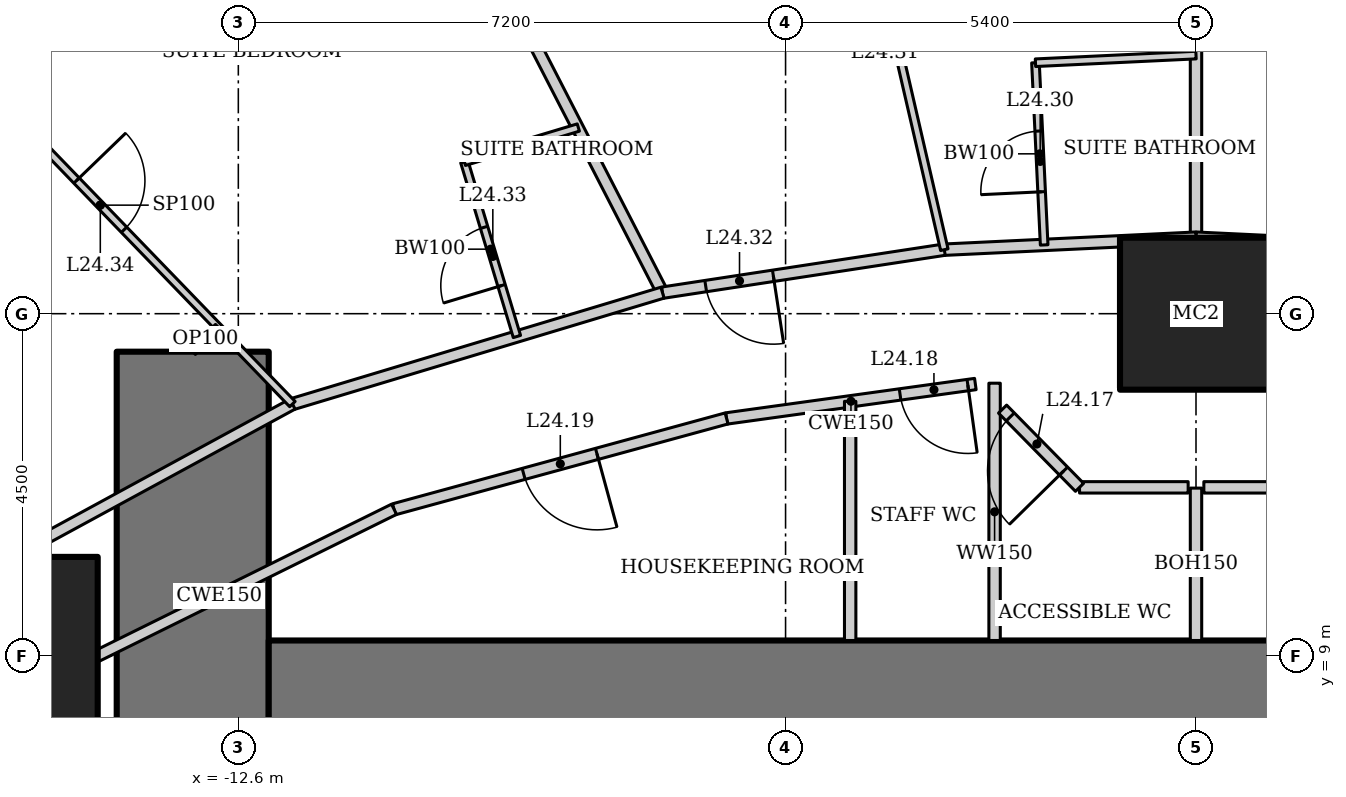
"""IFC4 building model, lengths in metres.
Left out: names, types, materials, properties, quantities, classifications, styles, units other than length and angle.
Written with IfcOpenShell. Run it as: python <this file> out.ifc"""

import sys

from ifc_helpers import new_model, si_unit, direction, frame, frame_2d, origin, origin_2d, place, context, subcontext, project, spatial, rectangle, hollow_rectangle, extrude, element, fill, save


model = new_model("IFC4")
c1 = context("Model", 3, precision=1e-05, world=origin(), true_north=direction((0.0, 1.0)))
c2 = subcontext(c1, "Body", "Model", "MODEL_VIEW")
j1 = project(units=[si_unit("LENGTHUNIT", "METRE"), si_unit("PLANEANGLEUNIT", "RADIAN")], contexts=[c1])
p1 = place(None, origin())
s1 = spatial("IfcSite", under=j1, at=p1, CompositionType="ELEMENT")
p2 = place(p1, origin())
s2 = spatial("IfcBuilding", under=s1, at=p2, CompositionType="ELEMENT")
p3 = place(p2, frame((0.0, 0.0, 101.8)))
s3 = spatial("IfcBuildingStorey", under=s2, at=p3, CompositionType="ELEMENT", Elevation=101.8)
p4 = place(p3, frame((0.0, 13.5, 0.0), z_axis=(0.0, 0.0, 1.0), x_axis=(1.0, 0.0, 0.0)))
e1 = element("IfcColumn", 1, at=p4, inside=s3, PredefinedType="COLUMN", context=c2, shape_type="SweptSolid", body=[
    extrude(hollow_rectangle(XDim=2.0, YDim=2.0, WallThickness=0.17, at=origin_2d()), origin(), (0.0, 0.0, 1.0), 3.6),
])
p5 = place(p3, frame((-15.75, 9.0, 0.0), z_axis=(0.0, 0.0, 1.0), x_axis=(1.0, 0.0, 0.0)))
e2 = element("IfcColumn", 2, at=p5, inside=s3, PredefinedType="COLUMN", context=c2, shape_type="SweptSolid", body=[
    extrude(hollow_rectangle(XDim=2.6, YDim=2.6, WallThickness=0.13, at=origin_2d()), origin(), (0.0, 0.0, 1.0), 3.6),
])
p6 = place(p3, frame((-13.2, 13.0, 0.0), z_axis=(0.0, 0.0, 1.0), x_axis=(0.0, -1.0, 0.0)))
e3 = element("IfcWall", 3, at=p6, inside=s3, PredefinedType="SHEAR", context=c2, shape_type="SweptSolid", body=[
    extrude(rectangle(XDim=26.0, YDim=2.0, at=frame_2d((13.0, 0.0))), origin(), (0.0, 0.0, 1.0), 3.6),
])
p7 = place(p6, frame((12.1, 0.0, 0.0)))
e4 = element("IfcOpeningElement", 4, at=p7, cuts=e3, PredefinedType="OPENING", context=c2, shape_type="SweptSolid", body=[
    extrude(rectangle(XDim=1.8, YDim=2.1, at=frame_2d((0.9, 1.05))), frame((0.0, 1.01, 0.0), z_axis=(0.0, -1.0, 0.0), x_axis=(1.0, 0.0, 0.0)), (0.0, 0.0, 1.0), 2.02),
])
p8 = place(p3, frame((12.2, 8.0, 0.0), z_axis=(0.0, 0.0, 1.0), x_axis=(-1.0, 0.0, 0.0)))
e5 = element("IfcWall", 5, at=p8, inside=s3, PredefinedType="SHEAR", context=c2, shape_type="SweptSolid", body=[
    extrude(rectangle(XDim=24.4, YDim=2.4, at=frame_2d((12.2, 0.0))), origin(), (0.0, 0.0, 1.0), 3.6),
])
p9 = place(p3, frame((0.0, 22.825, 0.0), z_axis=(0.0, 0.0, 1.0), x_axis=(0.0, -1.0, 0.0)))
e6 = element("IfcWall", 6, at=p9, inside=s3, PredefinedType="PARTITIONING", context=c2, shape_type="SweptSolid", body=[
    extrude(rectangle(XDim=8.325, YDim=0.15, at=frame_2d((4.162, 0.0))), origin(), (0.0, 0.0, 1.0), 2.2),
])
p10 = place(p3, frame((-10.912, 21.346, 0.0), z_axis=(0.0, 0.0, 1.0), x_axis=(0.457327273085, -0.889298468059, 0.0)))
e7 = element("IfcWall", 7, at=p10, inside=s3, PredefinedType="PARTITIONING", context=c2, shape_type="SweptSolid", body=[
    extrude(rectangle(XDim=8.511, YDim=0.15, at=frame_2d((4.256, 0.0))), origin(), (0.0, 0.0, 1.0), 2.463),
])
p11 = place(p3, frame((3.311, 14.342, 0.0), z_axis=(0.0, 0.0, 1.0), x_axis=(-0.998863968075, 0.047652631422, 0.0)))
e8 = element("IfcWall", 8, at=p11, inside=s3, PredefinedType="PARTITIONING", context=c2, shape_type="SweptSolid", body=[
    extrude(rectangle(XDim=3.315, YDim=0.15, at=frame_2d((1.657, 0.0))), origin(), (0.0, 0.0, 1.0), 3.4),
])
p12 = place(p11, frame((0.15, 0.0, 0.0)))
e9 = element("IfcOpeningElement", 9, at=p12, cuts=e8, PredefinedType="OPENING", context=c2, shape_type="SweptSolid", body=[
    extrude(rectangle(XDim=0.9, YDim=2.1, at=frame_2d((0.45, 1.05))), frame((0.0, 0.085, 0.0), z_axis=(0.0, -1.0, 0.0), x_axis=(1.0, 0.0, 0.0)), (0.0, 0.0, 1.0), 0.17),
])
p13 = place(p3, frame((0.0, 14.5, 0.0), z_axis=(0.0, 0.0, 1.0), x_axis=(-0.998863968075, -0.047652631422, 0.0)))
e10 = element("IfcWall", 10, at=p13, inside=s3, PredefinedType="PARTITIONING", context=c2, shape_type="SweptSolid", body=[
    extrude(rectangle(XDim=3.315, YDim=0.15, at=frame_2d((1.657, 0.0))), origin(), (0.0, 0.0, 1.0), 3.4),
])
p14 = place(p3, frame((-3.311, 14.342, 0.0), z_axis=(0.0, 0.0, 1.0), x_axis=(-0.988564270062, -0.150800145746, 0.0)))
e11 = element("IfcWall", 11, at=p14, inside=s3, PredefinedType="PARTITIONING", context=c2, shape_type="SweptSolid", body=[
    extrude(rectangle(XDim=3.751, YDim=0.15, at=frame_2d((1.875, 0.0))), origin(), (0.0, 0.0, 1.0), 3.4),
])
p15 = place(p14, frame((2.276, 0.0, 0.0)))
e12 = element("IfcOpeningElement", 12, at=p15, cuts=e11, PredefinedType="OPENING", context=c2, shape_type="SweptSolid", body=[
    extrude(rectangle(XDim=0.9, YDim=2.1, at=frame_2d((0.45, 1.05))), frame((0.0, 0.085, 0.0), z_axis=(0.0, -1.0, 0.0), x_axis=(1.0, 0.0, 0.0)), (0.0, 0.0, 1.0), 0.17),
])
p16 = place(p3, frame((-7.019, 13.776, 0.0), z_axis=(0.0, 0.0, 1.0), x_axis=(-0.957564241242, -0.288219922793, 0.0)))
e13 = element("IfcWall", 13, at=p16, inside=s3, PredefinedType="PARTITIONING", context=c2, shape_type="SweptSolid", body=[
    extrude(rectangle(XDim=5.085, YDim=0.15, at=frame_2d((2.542, 0.0))), origin(), (0.0, 0.0, 1.0), 3.4),
])
p17 = place(p3, frame((-11.888, 12.311, 0.0), z_axis=(0.0, 0.0, 1.0), x_axis=(-0.878450059298, -0.477834169267, 0.0)))
e14 = element("IfcWall", 14, at=p17, inside=s3, PredefinedType="PARTITIONING", context=c2, shape_type="SweptSolid", body=[
    extrude(rectangle(XDim=5.631, YDim=0.15, at=frame_2d((2.815, 0.0))), origin(), (0.0, 0.0, 1.0), 3.4),
])
p18 = place(p3, frame((-2.903, 12.574, 0.0), z_axis=(0.0, 0.0, 1.0), x_axis=(-0.990563451353, -0.137054911782, 0.0)))
e15 = element("IfcWall", 15, at=p18, inside=s3, PredefinedType="PARTITIONING", context=c2, shape_type="SweptSolid", body=[
    extrude(rectangle(XDim=3.304, YDim=0.15, at=frame_2d((1.652, 0.0))), origin(), (0.0, 0.0, 1.0), 3.4),
])
p19 = place(p18, frame((0.1, 0.0, 0.0)))
e16 = element("IfcOpeningElement", 16, at=p19, cuts=e15, PredefinedType="OPENING", context=c2, shape_type="SweptSolid", body=[
    extrude(rectangle(XDim=0.9, YDim=2.1, at=frame_2d((0.45, 1.05))), frame((0.0, 0.085, 0.0), z_axis=(0.0, -1.0, 0.0), x_axis=(1.0, 0.0, 0.0)), (0.0, 0.0, 1.0), 0.17),
])
p20 = place(p3, frame((-6.176, 12.122, 0.0), z_axis=(0.0, 0.0, 1.0), x_axis=(-0.964644466646, -0.263554648923, 0.0)))
e17 = element("IfcWall", 17, at=p20, inside=s3, PredefinedType="PARTITIONING", context=c2, shape_type="SweptSolid", body=[
    extrude(rectangle(XDim=4.535, YDim=0.15, at=frame_2d((2.268, 0.0))), origin(), (0.0, 0.0, 1.0), 3.4),
])
p21 = place(p20, frame((1.768, 0.0, 0.0)))
e18 = element("IfcOpeningElement", 18, at=p21, cuts=e17, PredefinedType="OPENING", context=c2, shape_type="SweptSolid", body=[
    extrude(rectangle(XDim=1.0, YDim=2.1, at=frame_2d((0.5, 1.05))), frame((0.0, 0.085, 0.0), z_axis=(0.0, -1.0, 0.0), x_axis=(1.0, 0.0, 0.0)), (0.0, 0.0, 1.0), 0.17),
])
p22 = place(p3, frame((-10.551, 10.926, 0.0), z_axis=(0.0, 0.0, 1.0), x_axis=(-0.89656943448, -0.442903205177, 0.0)))
e19 = element("IfcWall", 19, at=p22, inside=s3, PredefinedType="PARTITIONING", context=c2, shape_type="SweptSolid", body=[
    extrude(rectangle(XDim=5.126, YDim=0.15, at=frame_2d((2.563, 0.0))), origin(), (0.0, 0.0, 1.0), 3.4),
])
p23 = place(p3, frame((-2.65, 9.2, 0.0), z_axis=(0.0, 0.0, 1.0), x_axis=(0.0, 1.0, 0.0)))
e20 = element("IfcWall", 20, at=p23, inside=s3, PredefinedType="SOLIDWALL", context=c2, shape_type="SweptSolid", body=[
    extrude(rectangle(XDim=3.385, YDim=0.15, at=frame_2d((1.693, 0.0))), origin(), (0.0, 0.0, 1.0), 2.554),
])
p24 = place(p3, frame((-4.55, 9.2, 0.0), z_axis=(0.0, 0.0, 1.0), x_axis=(0.0, 1.0, 0.0)))
e21 = element("IfcWall", 21, at=p24, inside=s3, PredefinedType="SOLIDWALL", context=c2, shape_type="SweptSolid", body=[
    extrude(rectangle(XDim=3.147, YDim=0.15, at=frame_2d((1.573, 0.0))), origin(), (0.0, 0.0, 1.0), 3.4),
])
p25 = place(p3, frame((-1.998, 14.405, 0.0), z_axis=(0.0, 0.0, 1.0), x_axis=(-0.047608648396, 0.998866065395, 0.0)))
e22 = element("IfcWall", 22, at=p25, inside=s3, PredefinedType="PARTITIONING", context=c2, shape_type="SweptSolid", body=[
    extrude(rectangle(XDim=2.4, YDim=0.1, at=frame_2d((1.2, 0.0))), origin(), (0.0, 0.0, 1.0), 2.628),
])
p26 = place(p25, frame((0.7, 0.0, 0.0)))
e23 = element("IfcOpeningElement", 23, at=p26, cuts=e22, PredefinedType="OPENING", context=c2, shape_type="SweptSolid", body=[
    extrude(rectangle(XDim=0.8, YDim=2.1, at=frame_2d((0.4, 1.05))), frame((0.0, 0.06, 0.0), z_axis=(0.0, -1.0, 0.0), x_axis=(1.0, 0.0, 0.0)), (0.0, 0.0, 1.0), 0.12),
])
p27 = place(p3, frame((-2.112, 16.802, 0.0), z_axis=(0.0, 0.0, 1.0), x_axis=(0.998862383453, 0.047685835668, 0.0)))
e24 = element("IfcWall", 24, at=p27, inside=s3, PredefinedType="PARTITIONING", context=c2, shape_type="SweptSolid", body=[
    extrude(rectangle(XDim=2.115, YDim=0.1, at=frame_2d((1.057, 0.0))), origin(), (0.0, 0.0, 1.0), 3.4),
])
p28 = place(p3, frame((-4.874, 21.111, 0.0), z_axis=(0.0, 0.0, 1.0), x_axis=(0.224957040173, -0.974368682828, 0.0)))
e25 = element("IfcWall", 25, at=p28, inside=s3, PredefinedType="PARTITIONING", context=c2, shape_type="SweptSolid", body=[
    extrude(rectangle(XDim=6.947, YDim=0.1, at=frame_2d((3.473, 0.0))), origin(), (0.0, 0.0, 1.0), 2.554),
])
p29 = place(p28, frame((3.023, 0.0, 0.0)))
e26 = element("IfcOpeningElement", 26, at=p29, cuts=e25, PredefinedType="OPENING", context=c2, shape_type="SweptSolid", body=[
    extrude(rectangle(XDim=0.9, YDim=2.1, at=frame_2d((0.45, 1.05))), frame((0.0, 0.06, 0.0), z_axis=(0.0, -1.0, 0.0), x_axis=(1.0, 0.0, 0.0)), (0.0, 0.0, 1.0), 0.12),
])
p30 = place(p3, frame((-8.935, 13.2, 0.0), z_axis=(0.0, 0.0, 1.0), x_axis=(-0.288197066254, 0.957571120598, 0.0)))
e27 = element("IfcWall", 27, at=p30, inside=s3, PredefinedType="PARTITIONING", context=c2, shape_type="SweptSolid", body=[
    extrude(rectangle(XDim=2.4, YDim=0.1, at=frame_2d((1.2, 0.0))), origin(), (0.0, 0.0, 1.0), 3.4),
])
p31 = place(p30, frame((0.7, 0.0, 0.0)))
e28 = element("IfcOpeningElement", 28, at=p31, cuts=e27, PredefinedType="OPENING", context=c2, shape_type="SweptSolid", body=[
    extrude(rectangle(XDim=0.8, YDim=2.1, at=frame_2d((0.4, 1.05))), frame((0.0, 0.06, 0.0), z_axis=(0.0, -1.0, 0.0), x_axis=(1.0, 0.0, 0.0)), (0.0, 0.0, 1.0), 0.12),
])
p32 = place(p3, frame((-9.626, 15.498, 0.0), z_axis=(0.0, 0.0, 1.0), x_axis=(0.957551231109, 0.288263143328, 0.0)))
e29 = element("IfcWall", 29, at=p32, inside=s3, PredefinedType="PARTITIONING", context=c2, shape_type="SweptSolid", body=[
    extrude(rectangle(XDim=1.566, YDim=0.1, at=frame_2d((0.783, 0.0))), origin(), (0.0, 0.0, 1.0), 3.4),
])
p33 = place(p3, frame((-16.944, 17.545, 0.0), z_axis=(0.0, 0.0, 1.0), x_axis=(0.694669949151, -0.719328618746, 0.0)))
e30 = element("IfcWall", 30, at=p33, inside=s3, PredefinedType="PARTITIONING", context=c2, shape_type="SweptSolid", body=[
    extrude(rectangle(XDim=7.277, YDim=0.1, at=frame_2d((3.639, 0.0))), origin(), (0.0, 0.0, 1.0), 2.463),
])
p34 = place(p33, frame((3.189, 0.0, 0.0)))
e31 = element("IfcOpeningElement", 31, at=p34, cuts=e30, PredefinedType="OPENING", context=c2, shape_type="SweptSolid", body=[
    extrude(rectangle(XDim=0.9, YDim=2.1, at=frame_2d((0.45, 1.05))), frame((0.0, 0.06, 0.0), z_axis=(0.0, -1.0, 0.0), x_axis=(1.0, 0.0, 0.0)), (0.0, 0.0, 1.0), 0.12),
])
p35 = place(p3, frame((-13.2, 13.0, 0.0), z_axis=(0.0, 0.0, 1.0), x_axis=(0.719347134512, 0.69465077562, 0.0)))
e32 = element("IfcWall", 32, at=p35, inside=s3, PredefinedType="PARTITIONING", context=c2, shape_type="SweptSolid", body=[
    extrude(rectangle(XDim=0.465, YDim=0.1, at=frame_2d((0.232, 0.0))), origin(), (0.0, 0.0, 1.0), 3.4),
])
p36 = place(p3, frame((0.0, 9.2, 0.0), z_axis=(0.0, 0.0, 1.0), x_axis=(0.0, 1.0, 0.0)))
e33 = element("IfcWall", 33, at=p36, inside=s3, PredefinedType="PARTITIONING", context=c2, shape_type="SweptSolid", body=[
    extrude(rectangle(XDim=2.005, YDim=0.15, at=frame_2d((1.002, 0.0))), origin(), (0.0, 0.0, 1.0), 2.2),
])
for number, where, z_axis, x_axis in (
    (34, (1.532, 11.215, 0.0), (0.0, 0.0, 1.0), (-1.0, 0.0, 0.0)),
    (35, (-0.103, 11.215, 0.0), (0.0, 0.0, 1.0), (-1.0, 0.0, 0.0)),
):
    element("IfcWall", number, at=place(p3, frame(where, z_axis=z_axis, x_axis=x_axis)), inside=s3, PredefinedType="PARTITIONING", context=c2, shape_type="SweptSolid", body=[
        extrude(rectangle(XDim=1.429, YDim=0.15, at=frame_2d((0.714, 0.0))), origin(), (0.0, 0.0, 1.0), 3.4),
    ])
p37 = place(p3, frame((-1.532, 11.215, 0.0), z_axis=(0.0, 0.0, 1.0), x_axis=(-0.701250244986, 0.712915208077, 0.0)))
e36 = element("IfcWall", 36, at=p37, inside=s3, PredefinedType="PARTITIONING", context=c2, shape_type="SweptSolid", body=[
    extrude(rectangle(XDim=1.444, YDim=0.15, at=frame_2d((0.722, 0.0))), origin(), (0.0, 0.0, 1.0), 3.4),
])
p38 = place(p37, frame((0.3, 0.0, 0.0)))
e37 = element("IfcOpeningElement", 37, at=p38, cuts=e36, PredefinedType="OPENING", context=c2, shape_type="SweptSolid", body=[
    extrude(rectangle(XDim=1.0, YDim=2.1, at=frame_2d((0.5, 1.05))), frame((0.0, 0.085, 0.0), z_axis=(0.0, -1.0, 0.0), x_axis=(1.0, 0.0, 0.0)), (0.0, 0.0, 1.0), 0.17),
])
p39 = place(p38, origin())
e38 = element("IfcDoor", 38, at=p39, inside=s3, OperationType="SINGLE_SWING_LEFT", PredefinedType="DOOR", context=c2, shape_type="SweptSolid", body=[
    extrude(rectangle(XDim=1.0, YDim=2.1, at=frame_2d((0.5, 1.05))), frame((0.0, 0.025, 0.0), z_axis=(0.0, -1.0, 0.0), x_axis=(1.0, 0.0, 0.0)), (0.0, 0.0, 1.0), 0.05),
])
fill(e37, e38)
p40 = place(p19, origin())
e39 = element("IfcDoor", 39, at=p40, inside=s3, OperationType="SINGLE_SWING_LEFT", PredefinedType="DOOR", context=c2, shape_type="SweptSolid", body=[
    extrude(rectangle(XDim=0.9, YDim=2.1, at=frame_2d((0.45, 1.05))), frame((0.0, 0.025, 0.0), z_axis=(0.0, -1.0, 0.0), x_axis=(1.0, 0.0, 0.0)), (0.0, 0.0, 1.0), 0.05),
])
fill(e16, e39)
p41 = place(p21, origin())
e40 = element("IfcDoor", 40, at=p41, inside=s3, OperationType="SINGLE_SWING_LEFT", PredefinedType="DOOR", context=c2, shape_type="SweptSolid", body=[
    extrude(rectangle(XDim=1.0, YDim=2.1, at=frame_2d((0.5, 1.05))), frame((0.0, 0.025, 0.0), z_axis=(0.0, -1.0, 0.0), x_axis=(1.0, 0.0, 0.0)), (0.0, 0.0, 1.0), 0.05),
])
fill(e18, e40)
p42 = place(p26, origin())
e41 = element("IfcDoor", 41, at=p42, inside=s3, OperationType="SINGLE_SWING_LEFT", PredefinedType="DOOR", context=c2, shape_type="SweptSolid", body=[
    extrude(rectangle(XDim=0.8, YDim=2.1, at=frame_2d((0.4, 1.05))), frame((0.0, 0.025, 0.0), z_axis=(0.0, -1.0, 0.0), x_axis=(1.0, 0.0, 0.0)), (0.0, 0.0, 1.0), 0.05),
])
fill(e23, e41)
p43 = place(p15, origin())
e42 = element("IfcDoor", 42, at=p43, inside=s3, OperationType="SINGLE_SWING_LEFT", PredefinedType="DOOR", context=c2, shape_type="SweptSolid", body=[
    extrude(rectangle(XDim=0.9, YDim=2.1, at=frame_2d((0.45, 1.05))), frame((0.0, 0.025, 0.0), z_axis=(0.0, -1.0, 0.0), x_axis=(1.0, 0.0, 0.0)), (0.0, 0.0, 1.0), 0.05),
])
fill(e12, e42)
p44 = place(p31, origin())
e43 = element("IfcDoor", 43, at=p44, inside=s3, OperationType="SINGLE_SWING_LEFT", PredefinedType="DOOR", context=c2, shape_type="SweptSolid", body=[
    extrude(rectangle(XDim=0.8, YDim=2.1, at=frame_2d((0.4, 1.05))), frame((0.0, 0.025, 0.0), z_axis=(0.0, -1.0, 0.0), x_axis=(1.0, 0.0, 0.0)), (0.0, 0.0, 1.0), 0.05),
])
fill(e28, e43)
p45 = place(p34, origin())
e44 = element("IfcDoor", 44, at=p45, inside=s3, OperationType="SINGLE_SWING_LEFT", PredefinedType="DOOR", context=c2, shape_type="SweptSolid", body=[
    extrude(rectangle(XDim=0.9, YDim=2.1, at=frame_2d((0.45, 1.05))), frame((0.0, 0.025, 0.0), z_axis=(0.0, -1.0, 0.0), x_axis=(1.0, 0.0, 0.0)), (0.0, 0.0, 1.0), 0.05),
])
fill(e31, e44)
save(model, sys.argv[1])
